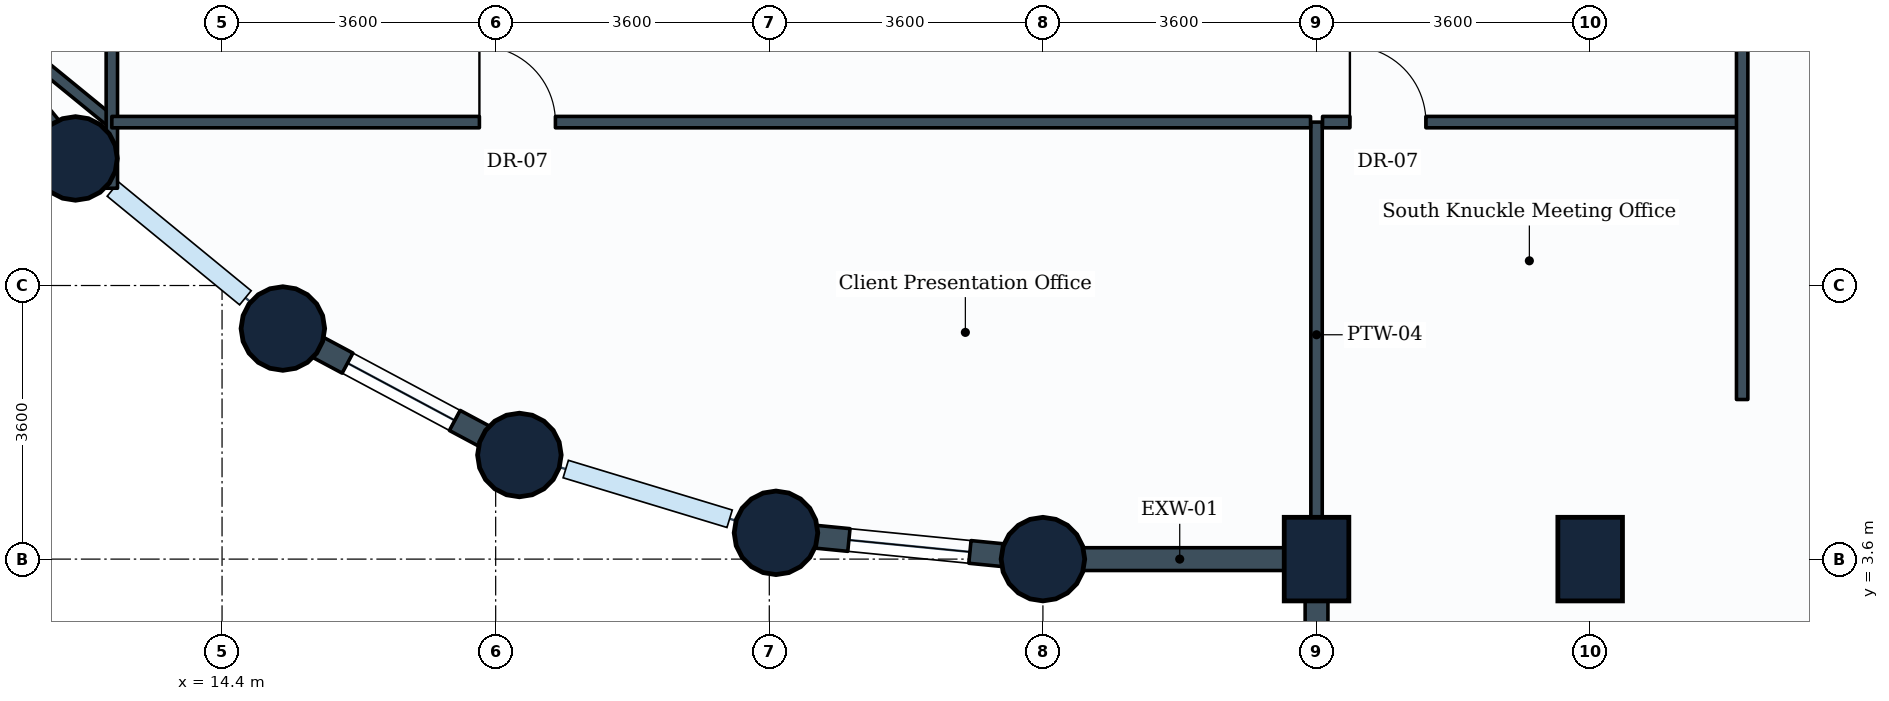
"""IFC4 building model, lengths in metres.
Left out: names, types, materials, properties, quantities, classifications, styles, units other than length and angle.
Written with IfcOpenShell. Run it as: python <this file> out.ifc"""

import sys

from ifc_helpers import new_model, si_unit, direction, frame, frame_2d, origin, origin_2d, place, context, subcontext, project, spatial, rectangle, circle, extrude, element, fill, save


model = new_model("IFC4")
c1 = context("Model", 3, precision=1e-05, world=origin(), true_north=direction((0.0, 1.0)))
c2 = subcontext(c1, "Body", "Model", "MODEL_VIEW")
j1 = project(units=[si_unit("LENGTHUNIT", "METRE"), si_unit("PLANEANGLEUNIT", "RADIAN")], contexts=[c1])
p1 = place(None, origin())
s1 = spatial("IfcSite", under=j1, at=p1, CompositionType="ELEMENT")
p2 = place(p1, origin())
s2 = spatial("IfcBuilding", under=s1, at=p2, CompositionType="ELEMENT")
p3 = place(p2, frame((0.0, 0.0, 99.6)))
s3 = spatial("IfcBuildingStorey", under=s2, at=p3, CompositionType="ELEMENT", Elevation=99.6)
for number, where, z_axis, x_axis in (
    (1, (12.472, 8.872, 0.0), (0.0, 0.0, 1.0), (1.0, 0.0, 0.0)),
    (2, (15.2, 6.634, 0.0), (0.0, 0.0, 1.0), (1.0, 0.0, 0.0)),
    (3, (18.312, 4.97, 0.0), (0.0, 0.0, 1.0), (1.0, 0.0, 0.0)),
    (4, (21.688, 3.946, 0.0), (0.0, 0.0, 1.0), (1.0, 0.0, 0.0)),
    (5, (25.2, 3.6, 0.0), (0.0, 0.0, 1.0), (1.0, 0.0, 0.0)),
):
    element("IfcColumn", number, at=place(p3, frame(where, z_axis=z_axis, x_axis=x_axis)), inside=s3, PredefinedType="COLUMN", context=c2, shape_type="SweptSolid", body=[
        extrude(circle(Radius=0.55, at=origin_2d()), origin(), (0.0, 0.0, 1.0), 3.9),
    ])
for number, where, z_axis, x_axis in (
    (6, (28.8, 3.6, 0.0), (0.0, 0.0, 1.0), (1.0, 0.0, 0.0)),
    (7, (32.4, 3.6, 0.0), (0.0, 0.0, 1.0), (1.0, 0.0, 0.0)),
):
    element("IfcColumn", number, at=place(p3, frame(where, z_axis=z_axis, x_axis=x_axis)), inside=s3, PredefinedType="COLUMN", context=c2, shape_type="SweptSolid", body=[
        extrude(rectangle(XDim=0.85, YDim=1.1, at=origin_2d()), origin(), (0.0, 0.0, 1.0), 3.9),
    ])
p4 = place(p3, frame((28.8, 3.6, 0.0), z_axis=(0.0, 0.0, 1.0), x_axis=(-1.0, 0.0, 0.0)))
e8 = element("IfcWall", 8, at=p4, inside=s3, PredefinedType="STANDARD", context=c2, shape_type="SweptSolid", body=[
    extrude(rectangle(XDim=3.6, YDim=0.3, at=frame_2d((1.8, 0.0))), origin(), (0.0, 0.0, 1.0), 2.93),
])
p5 = place(p3, frame((28.8, 3.6, 0.0), z_axis=(0.0, 0.0, 1.0), x_axis=(0.0, -1.0, 0.0)))
e9 = element("IfcWall", 9, at=p5, inside=s3, PredefinedType="STANDARD", context=c2, shape_type="SweptSolid", body=[
    extrude(rectangle(XDim=2.1, YDim=0.3, at=frame_2d((1.05, 0.0))), origin(), (0.0, 0.0, 1.0), 2.93),
])
p6 = place(p3, frame((12.472, 8.872, 0.0), z_axis=(0.0, 0.0, 1.0), x_axis=(-0.634258295121, 0.773121216285, 0.0)))
e10 = element("IfcWall", 10, at=p6, inside=s3, PredefinedType="STANDARD", context=c2, shape_type="SweptSolid", body=[
    extrude(rectangle(XDim=3.529, YDim=0.3, at=frame_2d((1.764, 0.0))), origin(), (0.0, 0.0, 1.0), 2.93),
])
p7 = place(p3, frame((18.312, 4.97, 0.0), z_axis=(0.0, 0.0, 1.0), x_axis=(-0.881846862014, 0.471535907389, 0.0)))
e11 = element("IfcWall", 11, at=p7, inside=s3, PredefinedType="STANDARD", context=c2, shape_type="SweptSolid", body=[
    extrude(rectangle(XDim=3.529, YDim=0.3, at=frame_2d((1.765, 0.0))), origin(), (0.0, 0.0, 1.0), 2.93),
])
p8 = place(p7, frame((0.964, 0.0, 0.85)))
e12 = element("IfcOpeningElement", 12, at=p8, cuts=e11, PredefinedType="OPENING", context=c2, shape_type="SweptSolid", body=[
    extrude(rectangle(XDim=1.6, YDim=1.35, at=frame_2d((0.8, 0.675))), frame((0.0, 0.16, 0.0), z_axis=(0.0, -1.0, 0.0), x_axis=(1.0, 0.0, 0.0)), (0.0, 0.0, 1.0), 0.32),
])
p9 = place(p3, frame((25.2, 3.6, 0.0), z_axis=(0.0, 0.0, 1.0), x_axis=(-0.995183369056, 0.098030923459, 0.0)))
e13 = element("IfcWall", 13, at=p9, inside=s3, PredefinedType="STANDARD", context=c2, shape_type="SweptSolid", body=[
    extrude(rectangle(XDim=3.529, YDim=0.3, at=frame_2d((1.765, 0.0))), origin(), (0.0, 0.0, 1.0), 2.93),
])
p10 = place(p9, frame((0.965, 0.0, 0.85)))
e14 = element("IfcOpeningElement", 14, at=p10, cuts=e13, PredefinedType="OPENING", context=c2, shape_type="SweptSolid", body=[
    extrude(rectangle(XDim=1.6, YDim=1.35, at=frame_2d((0.8, 0.675))), frame((0.0, 0.16, 0.0), z_axis=(0.0, -1.0, 0.0), x_axis=(1.0, 0.0, 0.0)), (0.0, 0.0, 1.0), 0.32),
])
p11 = place(p3, frame((28.8, 9.35, 0.0), z_axis=(0.0, 0.0, 1.0), x_axis=(0.0, -1.0, 0.0)))
e15 = element("IfcWall", 15, at=p11, inside=s3, PredefinedType="PARTITIONING", context=c2, shape_type="SweptSolid", body=[
    extrude(rectangle(XDim=5.596, YDim=0.15, at=frame_2d((2.798, 0.0))), origin(), (0.0, 0.0, 1.0), 3.635),
])
p12 = place(p3, frame((12.95, 9.35, 0.0), z_axis=(0.0, 0.0, 1.0), x_axis=(-0.774315108081, 0.632800216022, 0.0)))
e16 = element("IfcWall", 16, at=p12, inside=s3, PredefinedType="PARTITIONING", context=c2, shape_type="SweptSolid", body=[
    extrude(rectangle(XDim=2.37, YDim=0.15, at=frame_2d((1.185, 0.0))), origin(), (0.0, 0.0, 1.0), 2.93),
])
p13 = place(p3, frame((12.95, 8.48, 0.0), z_axis=(0.0, 0.0, 1.0), x_axis=(0.0, 1.0, 0.0)))
e17 = element("IfcWall", 17, at=p13, inside=s3, PredefinedType="PARTITIONING", context=c2, shape_type="SweptSolid", body=[
    extrude(rectangle(XDim=8.041, YDim=0.15, at=frame_2d((4.021, 0.0))), origin(), (0.0, 0.0, 1.0), 2.93),
])
p14 = place(p13, frame((5.101, 0.0, 0.0)))
e18 = element("IfcOpeningElement", 18, at=p14, cuts=e17, PredefinedType="OPENING", context=c2, shape_type="SweptSolid", body=[
    extrude(rectangle(XDim=1.0, YDim=2.1, at=frame_2d((0.5, 1.05))), frame((0.0, 0.085, 0.0), z_axis=(0.0, -1.0, 0.0), x_axis=(1.0, 0.0, 0.0)), (0.0, 0.0, 1.0), 0.17),
])
p15 = place(p3, frame((12.95, 9.35, 0.0), z_axis=(0.0, 0.0, 1.0), x_axis=(1.0, 0.0, 0.0)))
e19 = element("IfcWall", 19, at=p15, inside=s3, PredefinedType="PARTITIONING", context=c2, shape_type="SweptSolid", body=[
    extrude(rectangle(XDim=15.771, YDim=0.15, at=frame_2d((7.885, 0.0))), origin(), (0.0, 0.0, 1.0), 3.18),
])
p16 = place(p15, frame((4.836, 0.0, 0.0)))
e20 = element("IfcOpeningElement", 20, at=p16, cuts=e19, PredefinedType="OPENING", context=c2, shape_type="SweptSolid", body=[
    extrude(rectangle(XDim=1.0, YDim=2.1, at=frame_2d((0.5, 1.05))), frame((0.0, 0.085, 0.0), z_axis=(0.0, -1.0, 0.0), x_axis=(1.0, 0.0, 0.0)), (0.0, 0.0, 1.0), 0.17),
])
p17 = place(p3, frame((28.879, 9.35, 0.0), z_axis=(0.0, 0.0, 1.0), x_axis=(1.0, 0.0, 0.0)))
e21 = element("IfcWall", 21, at=p17, inside=s3, PredefinedType="PARTITIONING", context=c2, shape_type="SweptSolid", body=[
    extrude(rectangle(XDim=5.521, YDim=0.15, at=frame_2d((2.76, 0.0))), origin(), (0.0, 0.0, 1.0), 3.635),
])
p18 = place(p17, frame((0.36, 0.0, 0.0)))
e22 = element("IfcOpeningElement", 22, at=p18, cuts=e21, PredefinedType="OPENING", context=c2, shape_type="SweptSolid", body=[
    extrude(rectangle(XDim=1.0, YDim=2.1, at=frame_2d((0.5, 1.05))), frame((0.0, 0.085, 0.0), z_axis=(0.0, -1.0, 0.0), x_axis=(1.0, 0.0, 0.0)), (0.0, 0.0, 1.0), 0.17),
])
p19 = place(p3, frame((34.4, 5.7, 0.0), z_axis=(0.0, 0.0, 1.0), x_axis=(0.0, 1.0, 0.0)))
e23 = element("IfcWall", 23, at=p19, inside=s3, PredefinedType="PARTITIONING", context=c2, shape_type="SweptSolid", body=[
    extrude(rectangle(XDim=12.15, YDim=0.15, at=frame_2d((6.075, 0.0))), origin(), (0.0, 0.0, 1.0), 3.18),
])
p20 = place(p8, origin())
e24 = element("IfcWindow", 24, at=p20, inside=s3, PartitioningType="SINGLE_PANEL", PredefinedType="WINDOW", context=c2, shape_type="SweptSolid", body=[
    extrude(rectangle(XDim=1.6, YDim=1.35, at=frame_2d((0.8, 0.675))), frame((0.0, 0.03, 0.0), z_axis=(0.0, -1.0, 0.0), x_axis=(1.0, 0.0, 0.0)), (0.0, 0.0, 1.0), 0.06),
])
fill(e12, e24)
p21 = place(p10, origin())
e25 = element("IfcWindow", 25, at=p21, inside=s3, PartitioningType="SINGLE_PANEL", PredefinedType="WINDOW", context=c2, shape_type="SweptSolid", body=[
    extrude(rectangle(XDim=1.6, YDim=1.35, at=frame_2d((0.8, 0.675))), frame((0.0, 0.03, 0.0), z_axis=(0.0, -1.0, 0.0), x_axis=(1.0, 0.0, 0.0)), (0.0, 0.0, 1.0), 0.06),
])
fill(e14, e25)
p22 = place(p16, origin())
e26 = element("IfcDoor", 26, at=p22, inside=s3, OperationType="SINGLE_SWING_LEFT", PredefinedType="DOOR", context=c2, shape_type="SweptSolid", body=[
    extrude(rectangle(XDim=1.0, YDim=2.1, at=frame_2d((0.5, 1.05))), frame((0.0, 0.025, 0.0), z_axis=(0.0, -1.0, 0.0), x_axis=(1.0, 0.0, 0.0)), (0.0, 0.0, 1.0), 0.05),
])
fill(e20, e26)
p23 = place(p18, origin())
e27 = element("IfcDoor", 27, at=p23, inside=s3, OperationType="SINGLE_SWING_LEFT", PredefinedType="DOOR", context=c2, shape_type="SweptSolid", body=[
    extrude(rectangle(XDim=1.0, YDim=2.1, at=frame_2d((0.5, 1.05))), frame((0.0, 0.025, 0.0), z_axis=(0.0, -1.0, 0.0), x_axis=(1.0, 0.0, 0.0)), (0.0, 0.0, 1.0), 0.05),
])
fill(e22, e27)
save(model, sys.argv[1])
